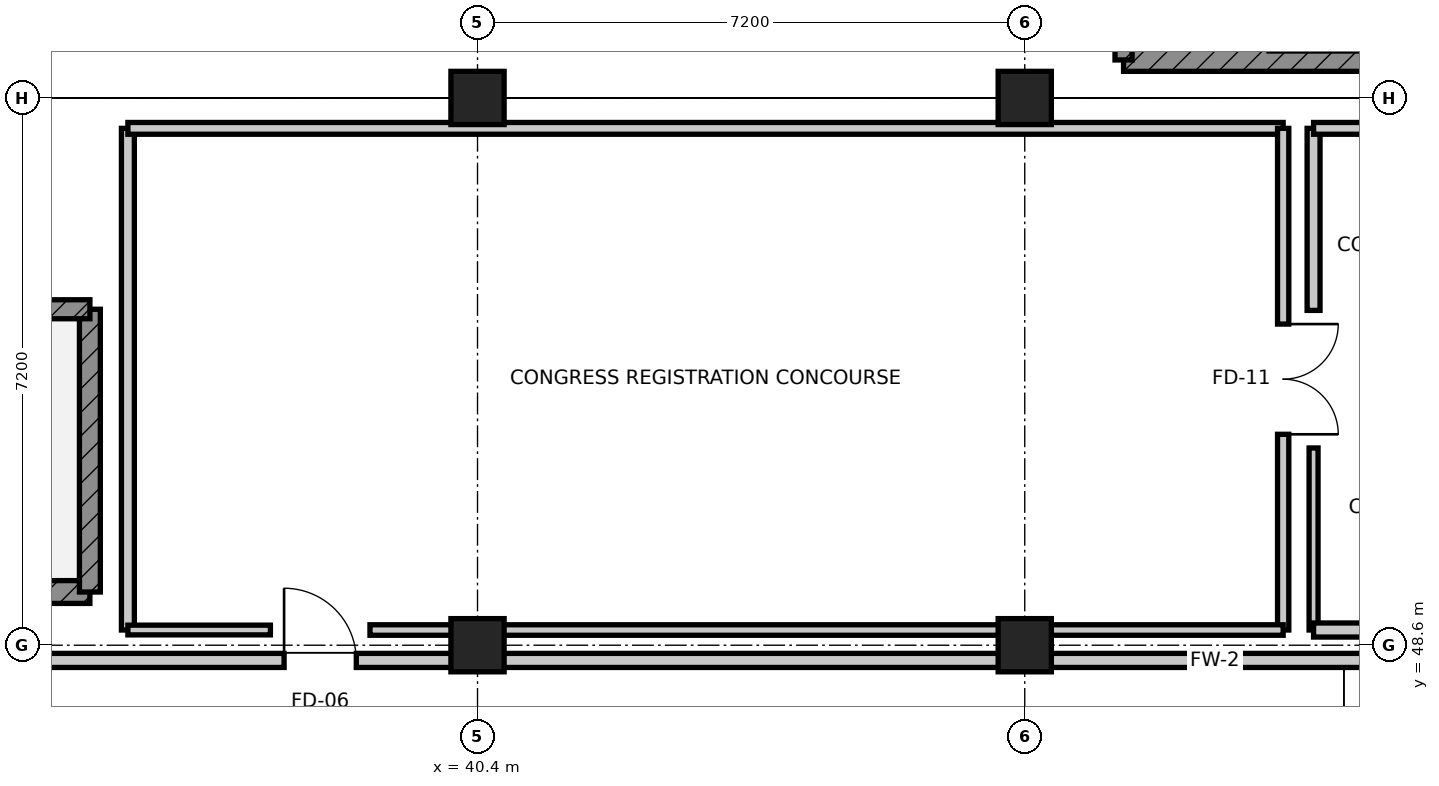
"""IFC4 building model, lengths in metres.
Left out: names, types, materials, properties, quantities, classifications, styles, units other than length and angle.
Written with IfcOpenShell. Run it as: python <this file> out.ifc"""

import sys

from ifc_helpers import new_model, si_unit, direction, frame, frame_2d, origin, origin_2d, place, context, subcontext, project, spatial, rectangle, extrude, element, fill, save


model = new_model("IFC4")
c1 = context("Model", 3, precision=1e-05, world=origin(), true_north=direction((0.0, 1.0)))
c2 = subcontext(c1, "Body", "Model", "MODEL_VIEW")
j1 = project(units=[si_unit("LENGTHUNIT", "METRE"), si_unit("PLANEANGLEUNIT", "RADIAN")], contexts=[c1])
p1 = place(None, origin())
s1 = spatial("IfcSite", under=j1, at=p1, CompositionType="ELEMENT")
p2 = place(p1, origin())
s2 = spatial("IfcBuilding", under=s1, at=p2, CompositionType="ELEMENT")
p3 = place(p2, origin())
s3 = spatial("IfcBuildingStorey", under=s2, at=p3, CompositionType="ELEMENT", Elevation=0.0)
for number, where, z_axis, x_axis in (
    (1, (40.4, 48.6, 0.0), (0.0, 0.0, 1.0), (1.0, 0.0, 0.0)),
    (2, (40.4, 55.8, 0.0), (0.0, 0.0, 1.0), (1.0, 0.0, 0.0)),
    (3, (47.6, 48.6, 0.0), (0.0, 0.0, 1.0), (1.0, 0.0, 0.0)),
    (4, (47.6, 55.8, 0.0), (0.0, 0.0, 1.0), (1.0, 0.0, 0.0)),
):
    element("IfcColumn", number, at=place(p3, frame(where, z_axis=z_axis, x_axis=x_axis)), inside=s3, PredefinedType="COLUMN", context=c2, shape_type="SweptSolid", body=[
        extrude(rectangle(XDim=0.7, YDim=0.7, at=origin_2d()), origin(), (0.0, 0.0, 1.0), 5.4),
    ])
p4 = place(p3, frame((26.7, 49.3, 0.0), z_axis=(0.0, 0.0, 1.0), x_axis=(1.0, 0.0, 0.0)))
e5 = element("IfcWall", 5, at=p4, inside=s3, PredefinedType="SHEAR", context=c2, shape_type="SweptSolid", body=[
    extrude(rectangle(XDim=8.6, YDim=0.3, at=frame_2d((4.3, 0.0))), origin(), (0.0, 0.0, 1.0), 5.1),
])
p5 = place(p3, frame((35.3, 49.3, 0.0), z_axis=(0.0, 0.0, 1.0), x_axis=(0.0, 1.0, 0.0)))
e6 = element("IfcWall", 6, at=p5, inside=s3, PredefinedType="SHEAR", context=c2, shape_type="SweptSolid", body=[
    extrude(rectangle(XDim=3.72, YDim=0.275, at=frame_2d((1.86, 0.0))), origin(), (0.0, 0.0, 1.0), 5.1),
])
p6 = place(p3, frame((35.3, 53.02, 0.0), z_axis=(0.0, 0.0, 1.0), x_axis=(-1.0, 0.0, 0.0)))
e7 = element("IfcWall", 7, at=p6, inside=s3, PredefinedType="SHEAR", context=c2, shape_type="SweptSolid", body=[
    extrude(rectangle(XDim=8.6, YDim=0.25, at=frame_2d((4.3, 0.0))), origin(), (0.0, 0.0, 1.0), 5.1),
])
p7 = place(p6, frame((7.06, 0.0, 0.0)))
e8 = element("IfcOpeningElement", 8, at=p7, cuts=e7, PredefinedType="OPENING", context=c2, shape_type="SweptSolid", body=[
    extrude(rectangle(XDim=1.1, YDim=2.1, at=frame_2d((0.55, 1.05))), frame((0.0, 0.135, 0.0), z_axis=(0.0, -1.0, 0.0), x_axis=(1.0, 0.0, 0.0)), (0.0, 0.0, 1.0), 0.27),
])
p8 = place(p3, frame((48.9, 56.3, 0.0), z_axis=(0.0, 0.0, 1.0), x_axis=(1.0, 0.0, 0.0)))
e9 = element("IfcWall", 9, at=p8, inside=s3, PredefinedType="SHEAR", context=c2, shape_type="SweptSolid", body=[
    extrude(rectangle(XDim=8.6, YDim=0.3, at=frame_2d((4.3, 0.0))), origin(), (0.0, 0.0, 1.0), 5.1),
])
p9 = place(p3, frame((48.9, 60.02, 0.0), z_axis=(0.0, 0.0, 1.0), x_axis=(0.0, -1.0, 0.0)))
e10 = element("IfcWall", 10, at=p9, inside=s3, PredefinedType="SHEAR", context=c2, shape_type="SweptSolid", body=[
    extrude(rectangle(XDim=3.72, YDim=0.225, at=frame_2d((1.86, 0.0))), origin(), (0.0, 0.0, 1.0), 5.1),
])
p10 = place(p3, frame((18.26, 48.4, 0.0), z_axis=(0.0, 0.0, 1.0), x_axis=(1.0, 0.0, 0.0)))
e11 = element("IfcWall", 11, at=p10, inside=s3, PredefinedType="PARTITIONING", context=c2, shape_type="SweptSolid", body=[
    extrude(rectangle(XDim=43.14, YDim=0.185, at=frame_2d((21.57, 0.0))), origin(), (0.0, 0.0, 1.0), 2.367),
])
p11 = place(p10, frame((19.595, 0.0, 0.0)))
e12 = element("IfcOpeningElement", 12, at=p11, cuts=e11, PredefinedType="OPENING", context=c2, shape_type="SweptSolid", body=[
    extrude(rectangle(XDim=0.95, YDim=2.1, at=frame_2d((0.475, 1.05))), frame((0.0, 0.103, 0.0), z_axis=(0.0, -1.0, 0.0), x_axis=(1.0, 0.0, 0.0)), (0.0, 0.0, 1.0), 0.205),
])
p12 = place(p3, frame((35.8, 48.8, 0.0), z_axis=(0.0, 0.0, 1.0), x_axis=(0.0, 1.0, 0.0)))
e13 = element("IfcWall", 13, at=p12, inside=s3, PredefinedType="PARTITIONING", context=c2, shape_type="SweptSolid", body=[
    extrude(rectangle(XDim=6.6, YDim=0.17, at=frame_2d((3.3, 0.0))), origin(), (0.0, 0.0, 1.0), 5.1),
])
p13 = place(p3, frame((35.8, 55.4, 0.0), z_axis=(0.0, 0.0, 1.0), x_axis=(1.0, 0.0, 0.0)))
e14 = element("IfcWall", 14, at=p13, inside=s3, PredefinedType="PARTITIONING", context=c2, shape_type="SweptSolid", body=[
    extrude(rectangle(XDim=15.2, YDim=0.155, at=frame_2d((7.6, 0.0))), origin(), (0.0, 0.0, 1.0), 4.548),
])
p14 = place(p3, frame((51.0, 55.4, 0.0), z_axis=(0.0, 0.0, 1.0), x_axis=(0.0, -1.0, 0.0)))
e15 = element("IfcWall", 15, at=p14, inside=s3, PredefinedType="PARTITIONING", context=c2, shape_type="SweptSolid", body=[
    extrude(rectangle(XDim=6.6, YDim=0.148, at=frame_2d((3.3, 0.0))), origin(), (0.0, 0.0, 1.0), 4.727),
])
p15 = place(p14, frame((2.575, 0.0, 0.0)))
e16 = element("IfcOpeningElement", 16, at=p15, cuts=e15, PredefinedType="OPENING", context=c2, shape_type="SweptSolid", body=[
    extrude(rectangle(XDim=1.45, YDim=2.2, at=frame_2d((0.725, 1.1))), frame((0.0, 0.084, 0.0), z_axis=(0.0, -1.0, 0.0), x_axis=(1.0, 0.0, 0.0)), (0.0, 0.0, 1.0), 0.168),
])
p16 = place(p3, frame((51.0, 48.8, 0.0), z_axis=(0.0, 0.0, 1.0), x_axis=(-1.0, 0.0, 0.0)))
e17 = element("IfcWall", 17, at=p16, inside=s3, PredefinedType="PARTITIONING", context=c2, shape_type="SweptSolid", body=[
    extrude(rectangle(XDim=12.015, YDim=0.138, at=frame_2d((6.007, 0.0))), origin(), (0.0, 0.0, 1.0), 4.473),
])
p17 = place(p3, frame((37.675, 48.8, 0.0), z_axis=(0.0, 0.0, 1.0), x_axis=(-1.0, 0.0, 0.0)))
e18 = element("IfcWall", 18, at=p17, inside=s3, PredefinedType="PARTITIONING", context=c2, shape_type="SweptSolid", body=[
    extrude(rectangle(XDim=1.875, YDim=0.128, at=frame_2d((0.938, 0.0))), origin(), (0.0, 0.0, 1.0), 4.473),
])
p18 = place(p3, frame((51.4, 48.8, 0.0), z_axis=(0.0, 0.0, 1.0), x_axis=(0.0, 1.0, 0.0)))
e19 = element("IfcWall", 19, at=p18, inside=s3, PredefinedType="PARTITIONING", context=c2, shape_type="SweptSolid", body=[
    extrude(rectangle(XDim=2.395, YDim=0.118, at=frame_2d((1.198, 0.0))), origin(), (0.0, 0.0, 1.0), 5.1),
])
p19 = place(p3, frame((56.4, 48.8, 0.0), z_axis=(0.0, 0.0, 1.0), x_axis=(-1.0, 0.0, 0.0)))
e20 = element("IfcWall", 20, at=p19, inside=s3, PredefinedType="PARTITIONING", context=c2, shape_type="SweptSolid", body=[
    extrude(rectangle(XDim=5.0, YDim=0.185, at=frame_2d((2.5, 0.0))), origin(), (0.0, 0.0, 1.0), 4.473),
])
p20 = place(p3, frame((51.4, 53.005, 0.0), z_axis=(0.0, 0.0, 1.0), x_axis=(0.0, 1.0, 0.0)))
e21 = element("IfcWall", 21, at=p20, inside=s3, PredefinedType="PARTITIONING", context=c2, shape_type="SweptSolid", body=[
    extrude(rectangle(XDim=2.395, YDim=0.17, at=frame_2d((1.198, 0.0))), origin(), (0.0, 0.0, 1.0), 5.1),
])
p21 = place(p3, frame((51.4, 55.4, 0.0), z_axis=(0.0, 0.0, 1.0), x_axis=(1.0, 0.0, 0.0)))
e22 = element("IfcWall", 22, at=p21, inside=s3, PredefinedType="PARTITIONING", context=c2, shape_type="SweptSolid", body=[
    extrude(rectangle(XDim=5.0, YDim=0.155, at=frame_2d((2.5, 0.0))), origin(), (0.0, 0.0, 1.0), 4.548),
])
p22 = place(p11, origin())
e23 = element("IfcDoor", 23, at=p22, inside=s3, OperationType="SINGLE_SWING_LEFT", PredefinedType="DOOR", context=c2, shape_type="SweptSolid", body=[
    extrude(rectangle(XDim=0.95, YDim=2.1, at=frame_2d((0.475, 1.05))), frame((0.0, 0.025, 0.0), z_axis=(0.0, -1.0, 0.0), x_axis=(1.0, 0.0, 0.0)), (0.0, 0.0, 1.0), 0.05),
])
fill(e12, e23)
p23 = place(p15, origin())
e24 = element("IfcDoor", 24, at=p23, inside=s3, OperationType="DOUBLE_DOOR_SINGLE_SWING", PredefinedType="DOOR", context=c2, shape_type="SweptSolid", body=[
    extrude(rectangle(XDim=1.45, YDim=2.2, at=frame_2d((0.725, 1.1))), frame((0.0, 0.025, 0.0), z_axis=(0.0, -1.0, 0.0), x_axis=(1.0, 0.0, 0.0)), (0.0, 0.0, 1.0), 0.05),
])
fill(e16, e24)
save(model, sys.argv[1])
